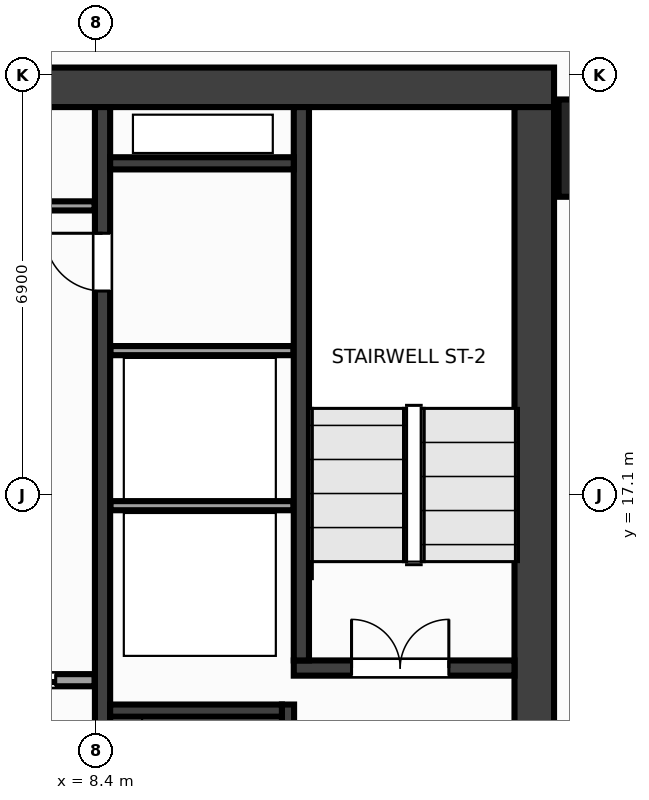
"""IFC4 building model, lengths in metres.
Left out: names, types, materials, properties, quantities, classifications, styles, units other than length and angle.
Written with IfcOpenShell. Run it as: python <this file> out.ifc"""

import sys

from ifc_helpers import new_model, si_unit, direction, frame, frame_2d, origin, origin_2d, place, context, subcontext, project, spatial, rectangle, extrude, source, transform, mapped, element, fill, save


model = new_model("IFC4")
c1 = context("Model", 3, precision=1e-05, world=origin(), true_north=direction((0.0, 1.0)))
c2 = subcontext(c1, "Body", "Model", "MODEL_VIEW")
j1 = project(units=[si_unit("LENGTHUNIT", "METRE"), si_unit("PLANEANGLEUNIT", "RADIAN")], contexts=[c1])
p1 = place(None, origin())
s1 = spatial("IfcSite", under=j1, at=p1, CompositionType="ELEMENT")
p2 = place(p1, origin())
s2 = spatial("IfcBuilding", under=s1, at=p2, CompositionType="ELEMENT")
p3 = place(p2, frame((0.0, 0.0, 84.8)))
s3 = spatial("IfcBuildingStorey", under=s2, at=p3, CompositionType="ELEMENT", Elevation=84.8)
m1 = source(origin(), c2, "Body", "SweptSolid", [
    extrude(rectangle(XDim=31.85, YDim=0.65, at=frame_2d((15.925, 0.0))), origin(), (0.0, 0.0, 1.0), 3.6),
])
p4 = place(p3, frame((-15.925, 23.8, 0.0), z_axis=(0.0, 0.0, 1.0), x_axis=(1.0, 0.0, 0.0)))
e1 = element("IfcWall", 1, at=p4, inside=s3, PredefinedType="SHEAR", context=c2, shape_type="MappedRepresentation", body=[
    mapped(m1, transform((0.0, 0.0, 0.0), x_axis=(1.0, 0.0, 0.0), y_axis=(0.0, 1.0, 0.0), z_axis=(0.0, 0.0, 1.0), scale=1.0)),
])
m2 = source(origin(), c2, "Body", "SweptSolid", [
    extrude(rectangle(XDim=12.95, YDim=0.65, at=frame_2d((6.475, 0.0))), origin(), (0.0, 0.0, 1.0), 3.6),
])
p5 = place(p3, frame((15.6, 10.525, 0.0), z_axis=(0.0, 0.0, 1.0), x_axis=(0.0, 1.0, 0.0)))
e2 = element("IfcWall", 2, at=p5, inside=s3, PredefinedType="SHEAR", context=c2, shape_type="MappedRepresentation", body=[
    mapped(m2, transform((0.0, 0.0, 0.0), x_axis=(1.0, 0.0, 0.0), y_axis=(0.0, 1.0, 0.0), z_axis=(0.0, 0.0, 1.0), scale=1.0)),
])
m3 = source(origin(), c2, "Body", "SweptSolid", [
    extrude(rectangle(XDim=12.95, YDim=0.25, at=frame_2d((6.475, 0.0))), origin(), (0.0, 0.0, 1.0), 3.6),
])
p6 = place(p3, frame((8.5, 10.525, 0.0), z_axis=(0.0, 0.0, 1.0), x_axis=(0.0, 1.0, 0.0)))
e3 = element("IfcWall", 3, at=p6, inside=s3, PredefinedType="SHEAR", context=c2, shape_type="MappedRepresentation", body=[
    mapped(m3, transform((0.0, 0.0, 0.0), x_axis=(1.0, 0.0, 0.0), y_axis=(0.0, 1.0, 0.0), z_axis=(0.0, 0.0, 1.0), scale=1.0)),
])
p7 = place(p6, frame((9.925, 0.0, 0.0)))
e4 = element("IfcOpeningElement", 4, at=p7, cuts=e3, PredefinedType="OPENING", context=c2, shape_type="SweptSolid", body=[
    extrude(rectangle(XDim=0.95, YDim=2.15, at=frame_2d((0.475, 1.075))), frame((0.0, 0.137, 0.0), z_axis=(0.0, -1.0, 0.0), x_axis=(1.0, 0.0, 0.0)), (0.0, 0.0, 1.0), 0.274),
])
m4 = source(origin(), c2, "Body", "SweptSolid", [
    extrude(rectangle(XDim=3.63, YDim=0.25, at=frame_2d((1.815, 0.0))), origin(), (0.0, 0.0, 1.0), 3.6),
])
p8 = place(p3, frame((11.645, 14.25, 0.0), z_axis=(0.0, 0.0, 1.0), x_axis=(1.0, 0.0, 0.0)))
e5 = element("IfcWall", 5, at=p8, inside=s3, PredefinedType="SHEAR", context=c2, shape_type="MappedRepresentation", body=[
    mapped(m4, transform((0.0, 0.0, 0.0), x_axis=(1.0, 0.0, 0.0), y_axis=(0.0, 1.0, 0.0), z_axis=(0.0, 0.0, 1.0), scale=1.0)),
])
p9 = place(p8, frame((0.95, 0.0, 0.0)))
e6 = element("IfcOpeningElement", 6, at=p9, cuts=e5, PredefinedType="OPENING", context=c2, shape_type="SweptSolid", body=[
    extrude(rectangle(XDim=1.6, YDim=2.15, at=frame_2d((0.8, 1.075))), frame((0.0, 0.137, 0.0), z_axis=(0.0, -1.0, 0.0), x_axis=(1.0, 0.0, 0.0)), (0.0, 0.0, 1.0), 0.274),
])
m5 = source(origin(), c2, "Body", "SweptSolid", [
    extrude(rectangle(XDim=9.1, YDim=0.25, at=frame_2d((4.55, 0.0))), origin(), (0.0, 0.0, 1.0), 3.6),
])
p10 = place(p3, frame((11.77, 14.375, 0.0), z_axis=(0.0, 0.0, 1.0), x_axis=(0.0, 1.0, 0.0)))
e7 = element("IfcWall", 7, at=p10, inside=s3, PredefinedType="SHEAR", context=c2, shape_type="MappedRepresentation", body=[
    mapped(m5, transform((0.0, 0.0, 0.0), x_axis=(1.0, 0.0, 0.0), y_axis=(0.0, 1.0, 0.0), z_axis=(0.0, 0.0, 1.0), scale=1.0)),
])
m6 = source(origin(), c2, "Body", "SweptSolid", [
    extrude(rectangle(XDim=3.125, YDim=0.2, at=frame_2d((1.562, 0.0))), origin(), (0.0, 0.0, 1.0), 3.6),
])
p11 = place(p3, frame((11.55, 10.525, 0.0), z_axis=(0.0, 0.0, 1.0), x_axis=(0.0, 1.0, 0.0)))
e8 = element("IfcWall", 8, at=p11, inside=s3, PredefinedType="SHEAR", context=c2, shape_type="MappedRepresentation", body=[
    mapped(m6, transform((0.0, 0.0, 0.0), x_axis=(1.0, 0.0, 0.0), y_axis=(0.0, 1.0, 0.0), z_axis=(0.0, 0.0, 1.0), scale=1.0)),
])
p12 = place(p11, frame((0.9, 0.0, 0.0)))
e9 = element("IfcOpeningElement", 9, at=p12, cuts=e8, PredefinedType="OPENING", context=c2, shape_type="SweptSolid", body=[
    extrude(rectangle(XDim=1.1, YDim=2.15, at=frame_2d((0.55, 1.075))), frame((0.0, 0.112, 0.0), z_axis=(0.0, -1.0, 0.0), x_axis=(1.0, 0.0, 0.0)), (0.0, 0.0, 1.0), 0.224),
])
m7 = source(origin(), c2, "Body", "SweptSolid", [
    extrude(rectangle(XDim=2.825, YDim=0.2, at=frame_2d((1.413, 0.0))), origin(), (0.0, 0.0, 1.0), 3.6),
])
p13 = place(p3, frame((8.625, 13.55, 0.0), z_axis=(0.0, 0.0, 1.0), x_axis=(1.0, 0.0, 0.0)))
e10 = element("IfcWall", 10, at=p13, inside=s3, PredefinedType="SHEAR", context=c2, shape_type="MappedRepresentation", body=[
    mapped(m7, transform((0.0, 0.0, 0.0), x_axis=(1.0, 0.0, 0.0), y_axis=(0.0, 1.0, 0.0), z_axis=(0.0, 0.0, 1.0), scale=1.0)),
])
m8 = source(origin(), c2, "Body", "SweptSolid", [
    extrude(rectangle(XDim=3.02, YDim=0.2, at=frame_2d((1.51, 0.0))), origin(), (0.0, 0.0, 1.0), 3.6),
])
p14 = place(p3, frame((8.625, 22.55, 0.0), z_axis=(0.0, 0.0, 1.0), x_axis=(1.0, 0.0, 0.0)))
e11 = element("IfcWall", 11, at=p14, inside=s3, PredefinedType="SHEAR", context=c2, shape_type="MappedRepresentation", body=[
    mapped(m8, transform((0.0, 0.0, 0.0), x_axis=(1.0, 0.0, 0.0), y_axis=(0.0, 1.0, 0.0), z_axis=(0.0, 0.0, 1.0), scale=1.0)),
])
m9 = source(origin(), c2, "Body", "SweptSolid", [
    extrude(rectangle(XDim=1.6, YDim=1.6, at=origin_2d()), origin(), (0.0, 0.0, 1.0), 3.6),
])
p15 = place(p3, frame((16.8, 22.8, 0.0), z_axis=(0.0, 0.0, 1.0), x_axis=(1.0, 0.0, 0.0)))
e12 = element("IfcColumn", 12, at=p15, inside=s3, PredefinedType="COLUMN", context=c2, shape_type="MappedRepresentation", body=[
    mapped(m9, transform((0.0, 0.0, 0.0), x_axis=(1.0, 0.0, 0.0), y_axis=(0.0, 1.0, 0.0), z_axis=(0.0, 0.0, 1.0), scale=1.0)),
])
m10 = source(origin(), c2, "Body", "SweptSolid", [
    extrude(rectangle(XDim=3.01, YDim=0.15, at=frame_2d((1.505, 0.0))), origin(), (0.0, 0.0, 1.0), 3.36),
])
for number, where, z_axis, x_axis in (
    (13, (8.63, 16.92, 0.0), (0.0, 0.0, 1.0), (1.0, 0.0, 0.0)),
    (14, (8.63, 19.47, 0.0), (0.0, 0.0, 1.0), (1.0, 0.0, 0.0)),
):
    element("IfcWall", number, at=place(p3, frame(where, z_axis=z_axis, x_axis=x_axis)), inside=s3, PredefinedType="PARTITIONING", context=c2, shape_type="MappedRepresentation", body=[
        mapped(m10, transform((0.0, 0.0, 0.0), x_axis=(1.0, 0.0, 0.0), y_axis=(0.0, 1.0, 0.0), z_axis=(0.0, 0.0, 1.0), scale=1.0)),
    ])
m11 = source(origin(), c2, "Body", "SweptSolid", [
    extrude(rectangle(XDim=7.07, YDim=0.2, at=frame_2d((3.535, 0.0))), origin(), (0.0, 0.0, 1.0), 3.36),
])
p16 = place(p3, frame((1.3, 14.05, 0.0), z_axis=(0.0, 0.0, 1.0), x_axis=(1.0, 0.0, 0.0)))
e15 = element("IfcWall", 15, at=p16, inside=s3, PredefinedType="PARTITIONING", context=c2, shape_type="MappedRepresentation", body=[
    mapped(m11, transform((0.0, 0.0, 0.0), x_axis=(1.0, 0.0, 0.0), y_axis=(0.0, 1.0, 0.0), z_axis=(0.0, 0.0, 1.0), scale=1.0)),
])
p17 = place(p16, frame((0.63, 0.0, 0.0)))
e16 = element("IfcOpeningElement", 16, at=p17, cuts=e15, PredefinedType="OPENING", context=c2, shape_type="SweptSolid", body=[
    extrude(rectangle(XDim=1.1, YDim=2.15, at=frame_2d((0.55, 1.075))), frame((0.0, 0.112, 0.0), z_axis=(0.0, -1.0, 0.0), x_axis=(1.0, 0.0, 0.0)), (0.0, 0.0, 1.0), 0.224),
])
p18 = place(p16, frame((2.98, 0.0, 0.0)))
e17 = element("IfcOpeningElement", 17, at=p18, cuts=e15, PredefinedType="OPENING", context=c2, shape_type="SweptSolid", body=[
    extrude(rectangle(XDim=1.1, YDim=2.15, at=frame_2d((0.55, 1.075))), frame((0.0, 0.112, 0.0), z_axis=(0.0, -1.0, 0.0), x_axis=(1.0, 0.0, 0.0)), (0.0, 0.0, 1.0), 0.224),
])
p19 = place(p16, frame((5.33, 0.0, 0.0)))
e18 = element("IfcOpeningElement", 18, at=p19, cuts=e15, PredefinedType="OPENING", context=c2, shape_type="SweptSolid", body=[
    extrude(rectangle(XDim=1.1, YDim=2.15, at=frame_2d((0.55, 1.075))), frame((0.0, 0.112, 0.0), z_axis=(0.0, -1.0, 0.0), x_axis=(1.0, 0.0, 0.0)), (0.0, 0.0, 1.0), 0.224),
])
m12 = source(origin(), c2, "Body", "SweptSolid", [
    extrude(rectangle(XDim=2.07, YDim=0.15, at=frame_2d((1.035, 0.0))), origin(), (0.0, 0.0, 1.0), 3.36),
])
p20 = place(p3, frame((6.3, 21.85, 0.0), z_axis=(0.0, 0.0, 1.0), x_axis=(1.0, 0.0, 0.0)))
e19 = element("IfcWall", 19, at=p20, inside=s3, PredefinedType="PARTITIONING", context=c2, shape_type="MappedRepresentation", body=[
    mapped(m12, transform((0.0, 0.0, 0.0), x_axis=(1.0, 0.0, 0.0), y_axis=(0.0, 1.0, 0.0), z_axis=(0.0, 0.0, 1.0), scale=1.0)),
])
m13 = source(origin(), c2, "Body", "SweptSolid", [
    extrude(rectangle(XDim=1.6, YDim=2.15, at=frame_2d((0.8, 1.075))), frame((0.0, 0.025, 0.0), z_axis=(0.0, -1.0, 0.0), x_axis=(1.0, 0.0, 0.0)), (0.0, 0.0, 1.0), 0.05),
])
p21 = place(p9, origin())
e20 = element("IfcDoor", 20, at=p21, inside=s3, OperationType="DOUBLE_DOOR_SINGLE_SWING", PredefinedType="DOOR", context=c2, shape_type="MappedRepresentation", body=[
    mapped(m13, transform((0.0, 0.0, 0.0), x_axis=(1.0, 0.0, 0.0), y_axis=(0.0, 1.0, 0.0), z_axis=(0.0, 0.0, 1.0), scale=1.0)),
])
fill(e6, e20)
m14 = source(origin(), c2, "Body", "SweptSolid", [
    extrude(rectangle(XDim=0.95, YDim=2.15, at=frame_2d((0.475, 1.075))), frame((0.0, 0.025, 0.0), z_axis=(0.0, -1.0, 0.0), x_axis=(1.0, 0.0, 0.0)), (0.0, 0.0, 1.0), 0.05),
])
p22 = place(p7, origin())
e21 = element("IfcDoor", 21, at=p22, inside=s3, OperationType="SINGLE_SWING_RIGHT", PredefinedType="DOOR", context=c2, shape_type="MappedRepresentation", body=[
    mapped(m14, transform((0.0, 0.0, 0.0), x_axis=(1.0, 0.0, 0.0), y_axis=(0.0, 1.0, 0.0), z_axis=(0.0, 0.0, 1.0), scale=1.0)),
])
fill(e4, e21)
m15 = source(origin(), c2, "Body", "SweptSolid", [
    extrude(rectangle(XDim=1.1, YDim=2.15, at=frame_2d((0.55, 1.075))), frame((0.0, 0.025, 0.0), z_axis=(0.0, -1.0, 0.0), x_axis=(1.0, 0.0, 0.0)), (0.0, 0.0, 1.0), 0.05),
])
p23 = place(p19, origin())
e22 = element("IfcDoor", 22, at=p23, inside=s3, OperationType="DOUBLE_DOOR_SLIDING", PredefinedType="DOOR", context=c2, shape_type="MappedRepresentation", body=[
    mapped(m15, transform((0.0, 0.0, 0.0), x_axis=(1.0, 0.0, 0.0), y_axis=(0.0, 1.0, 0.0), z_axis=(0.0, 0.0, 1.0), scale=1.0)),
])
fill(e18, e22)
save(model, sys.argv[1])
